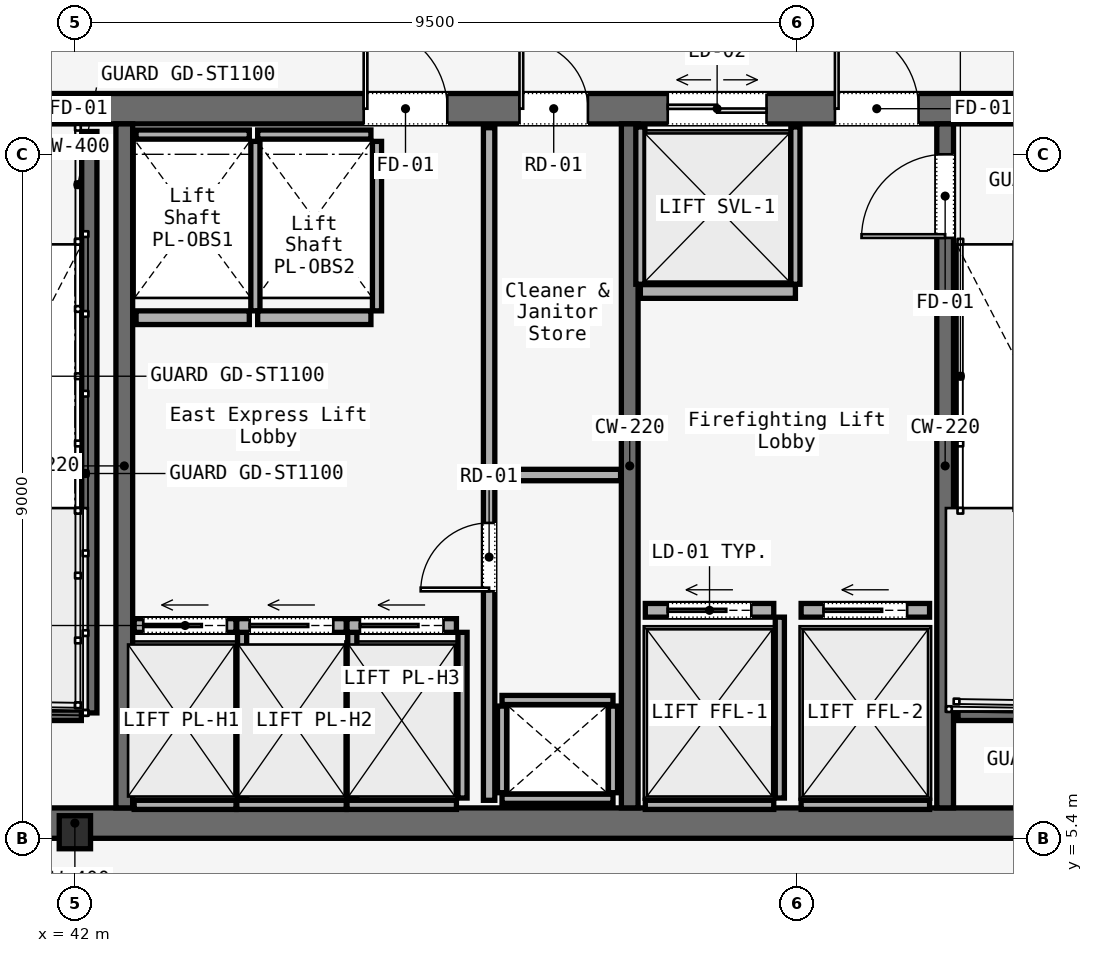
"""IFC4 building model, lengths in metres.
Left out: names, types, materials, properties, quantities, classifications, styles, units other than length and angle.
Written with IfcOpenShell. Run it as: python <this file> out.ifc"""

import sys

from ifc_helpers import new_model, si_unit, direction, frame, frame_2d, origin, origin_2d, place, context, subcontext, project, spatial, rectangle, i_section, extrude, element, fill, save


model = new_model("IFC4")
c1 = context("Model", 3, precision=1e-05, world=origin(), true_north=direction((0.0, 1.0)))
c2 = subcontext(c1, "Body", "Model", "MODEL_VIEW")
j1 = project(units=[si_unit("LENGTHUNIT", "METRE"), si_unit("PLANEANGLEUNIT", "RADIAN")], contexts=[c1])
p1 = place(None, origin())
s1 = spatial("IfcSite", under=j1, at=p1, CompositionType="ELEMENT")
p2 = place(p1, origin())
s2 = spatial("IfcBuilding", under=s1, at=p2, CompositionType="ELEMENT")
p3 = place(p2, frame((0.0, 0.0, 208.4)))
s3 = spatial("IfcBuildingStorey", under=s2, at=p3, CompositionType="ELEMENT", Elevation=208.4)
p4 = place(p3, frame((26.45, 15.0, 0.0), z_axis=(0.0, 0.0, 1.0), x_axis=(1.0, 0.0, 0.0)))
e1 = element("IfcWall", 1, at=p4, inside=s3, PredefinedType="SOLIDWALL", context=c2, shape_type="SweptSolid", body=[
    extrude(rectangle(XDim=31.1, YDim=0.4, at=frame_2d((15.55, 0.0))), origin(), (0.0, 0.0, 1.0), 4.52),
])
p5 = place(p4, frame((1.65, 0.0, 0.0)))
e2 = element("IfcOpeningElement", 2, at=p5, cuts=e1, PredefinedType="OPENING", context=c2, shape_type="SweptSolid", body=[
    extrude(rectangle(XDim=1.1, YDim=2.2, at=frame_2d((0.55, 1.1))), frame((0.0, 0.2, 0.0), z_axis=(0.0, -1.0, 0.0), x_axis=(1.0, 0.0, 0.0)), (0.0, 0.0, 1.0), 0.4),
])
p6 = place(p4, frame((13.65, 0.0, 0.0)))
e3 = element("IfcOpeningElement", 3, at=p6, cuts=e1, PredefinedType="OPENING", context=c2, shape_type="SweptSolid", body=[
    extrude(rectangle(XDim=1.1, YDim=2.2, at=frame_2d((0.55, 1.1))), frame((0.0, 0.2, 0.0), z_axis=(0.0, -1.0, 0.0), x_axis=(1.0, 0.0, 0.0)), (0.0, 0.0, 1.0), 0.4),
])
p7 = place(p4, frame((25.55, 0.0, 0.0)))
e4 = element("IfcOpeningElement", 4, at=p7, cuts=e1, PredefinedType="OPENING", context=c2, shape_type="SweptSolid", body=[
    extrude(rectangle(XDim=1.1, YDim=2.2, at=frame_2d((0.55, 1.1))), frame((0.0, 0.2, 0.0), z_axis=(0.0, -1.0, 0.0), x_axis=(1.0, 0.0, 0.0)), (0.0, 0.0, 1.0), 0.4),
])
p8 = place(p4, frame((10.7, 0.0, 0.0)))
e5 = element("IfcOpeningElement", 5, at=p8, cuts=e1, PredefinedType="OPENING", context=c2, shape_type="SweptSolid", body=[
    extrude(rectangle(XDim=1.4, YDim=2.2, at=frame_2d((0.7, 1.1))), frame((0.0, 0.2, 0.0), z_axis=(0.0, -1.0, 0.0), x_axis=(1.0, 0.0, 0.0)), (0.0, 0.0, 1.0), 0.4),
])
p9 = place(p4, frame((19.35, 0.0, 0.0)))
e6 = element("IfcOpeningElement", 6, at=p9, cuts=e1, PredefinedType="OPENING", context=c2, shape_type="SweptSolid", body=[
    extrude(rectangle(XDim=1.1, YDim=2.2, at=frame_2d((0.55, 1.1))), frame((0.0, 0.2, 0.0), z_axis=(0.0, -1.0, 0.0), x_axis=(1.0, 0.0, 0.0)), (0.0, 0.0, 1.0), 0.4),
])
p10 = place(p4, frame((21.4, 0.0, 0.0)))
e7 = element("IfcOpeningElement", 7, at=p10, cuts=e1, PredefinedType="OPENING", context=c2, shape_type="SweptSolid", body=[
    extrude(rectangle(XDim=0.9, YDim=2.1, at=frame_2d((0.45, 1.05))), frame((0.0, 0.2, 0.0), z_axis=(0.0, -1.0, 0.0), x_axis=(1.0, 0.0, 0.0)), (0.0, 0.0, 1.0), 0.4),
])
p11 = place(p4, frame((23.35, 0.0, 0.0)))
e8 = element("IfcOpeningElement", 8, at=p11, cuts=e1, PredefinedType="OPENING", context=c2, shape_type="SweptSolid", body=[
    extrude(rectangle(XDim=1.3, YDim=2.3, at=frame_2d((0.65, 1.15))), frame((0.0, 0.2, 0.0), z_axis=(0.0, -1.0, 0.0), x_axis=(1.0, 0.0, 0.0)), (0.0, 0.0, 1.0), 0.4),
])
p12 = place(p3, frame((26.45, 5.6, 0.0), z_axis=(0.0, 0.0, 1.0), x_axis=(1.0, 0.0, 0.0)))
e9 = element("IfcWall", 9, at=p12, inside=s3, PredefinedType="SOLIDWALL", context=c2, shape_type="SweptSolid", body=[
    extrude(rectangle(XDim=31.1, YDim=0.4, at=frame_2d((15.55, 0.0))), origin(), (0.0, 0.0, 1.0), 4.52),
])
for number, where, z_axis, x_axis in (
    (10, (42.65, 5.8, 0.0), (0.0, 0.0, 1.0), (0.0, 1.0, 0.0)),
    (11, (49.3, 5.8, 0.0), (0.0, 0.0, 1.0), (0.0, 1.0, 0.0)),
):
    element("IfcWall", number, at=place(p3, frame(where, z_axis=z_axis, x_axis=x_axis)), inside=s3, PredefinedType="SOLIDWALL", context=c2, shape_type="SweptSolid", body=[
        extrude(rectangle(XDim=9.0, YDim=0.22, at=frame_2d((4.5, 0.0))), origin(), (0.0, 0.0, 1.0), 4.52),
    ])
p13 = place(p3, frame((53.45, 5.8, 0.0), z_axis=(0.0, 0.0, 1.0), x_axis=(0.0, 1.0, 0.0)))
e12 = element("IfcWall", 12, at=p13, inside=s3, PredefinedType="SOLIDWALL", context=c2, shape_type="SweptSolid", body=[
    extrude(rectangle(XDim=9.0, YDim=0.22, at=frame_2d((4.5, 0.0))), origin(), (0.0, 0.0, 1.0), 4.52),
])
p14 = place(p13, frame((7.5, 0.0, 0.0)))
e13 = element("IfcOpeningElement", 13, at=p14, cuts=e12, PredefinedType="OPENING", context=c2, shape_type="SweptSolid", body=[
    extrude(rectangle(XDim=1.1, YDim=2.2, at=frame_2d((0.55, 1.1))), frame((0.0, 0.11, 0.0), z_axis=(0.0, -1.0, 0.0), x_axis=(1.0, 0.0, 0.0)), (0.0, 0.0, 1.0), 0.22),
])
p15 = place(p3, frame((42.0, 5.48, 0.0), z_axis=(0.0, 0.0, 1.0), x_axis=(1.0, 0.0, 0.0)))
e14 = element("IfcColumn", 14, at=p15, inside=s3, PredefinedType="COLUMN", context=c2, shape_type="SweptSolid", body=[
    extrude(i_section(OverallWidth=0.412, OverallDepth=0.435, WebThickness=0.036, FlangeThickness=0.044, FilletRadius=0.015, at=origin_2d()), origin(), (0.0, 0.0, 1.0), 4.52),
])
p16 = place(p3, frame((42.19, 14.7, 0.0), z_axis=(0.0, 0.0, 1.0), x_axis=(0.0, -1.0, 0.0)))
e15 = element("IfcWall", 15, at=p16, inside=s3, PredefinedType="SOLIDWALL", context=c2, shape_type="SweptSolid", body=[
    extrude(rectangle(XDim=7.65, YDim=0.2, at=frame_2d((3.825, 0.0))), origin(), (0.0, 0.0, 1.0), 4.8),
])
for number, where, z_axis, x_axis in (
    (16, (38.97, 7.05, 0.0), (0.0, 0.0, 1.0), (1.0, 0.0, 0.0)),
    (17, (53.62, 7.05, 0.0), (0.0, 0.0, 1.0), (1.0, 0.0, 0.0)),
):
    element("IfcWall", number, at=place(p3, frame(where, z_axis=z_axis, x_axis=x_axis)), inside=s3, PredefinedType="SOLIDWALL", context=c2, shape_type="SweptSolid", body=[
        extrude(rectangle(XDim=3.115, YDim=0.2, at=frame_2d((1.558, 0.0))), origin(), (0.0, 0.0, 1.0), 4.8),
    ])
for number, where, z_axis, x_axis in (
    (18, (47.62, 5.92, 0.0), (0.0, 0.0, 1.0), (1.0, 0.0, 0.0)),
    (19, (47.62, 7.22, 0.0), (0.0, 0.0, 1.0), (1.0, 0.0, 0.0)),
):
    element("IfcWall", number, at=place(p3, frame(where, z_axis=z_axis, x_axis=x_axis)), inside=s3, PredefinedType="SOLIDWALL", context=c2, shape_type="SweptSolid", body=[
        extrude(rectangle(XDim=1.46, YDim=0.12, at=frame_2d((0.73, 0.0))), origin(), (0.0, 0.0, 1.0), 3.39),
    ])
for number, where, z_axis, x_axis in (
    (20, (47.62, 6.0, 0.0), (0.0, 0.0, 1.0), (0.0, 1.0, 0.0)),
    (21, (49.08, 6.0, 0.0), (0.0, 0.0, 1.0), (0.0, 1.0, 0.0)),
):
    element("IfcWall", number, at=place(p3, frame(where, z_axis=z_axis, x_axis=x_axis)), inside=s3, PredefinedType="SOLIDWALL", context=c2, shape_type="SweptSolid", body=[
        extrude(rectangle(XDim=1.14, YDim=0.12, at=frame_2d((0.57, 0.0))), origin(), (0.0, 0.0, 1.0), 3.39),
    ])
p17 = place(p3, frame((47.45, 5.9, 0.0), z_axis=(0.0, 0.0, 1.0), x_axis=(0.0, 1.0, 0.0)))
e22 = element("IfcWall", 22, at=p17, inside=s3, PredefinedType="PARTITIONING", context=c2, shape_type="SweptSolid", body=[
    extrude(rectangle(XDim=8.85, YDim=0.15, at=frame_2d((4.425, 0.0))), origin(), (0.0, 0.0, 1.0), 3.39),
])
p18 = place(p17, frame((2.75, 0.0, 0.0)))
e23 = element("IfcOpeningElement", 23, at=p18, cuts=e22, PredefinedType="OPENING", context=c2, shape_type="SweptSolid", body=[
    extrude(rectangle(XDim=0.9, YDim=2.1, at=frame_2d((0.45, 1.05))), frame((0.0, 0.075, 0.0), z_axis=(0.0, -1.0, 0.0), x_axis=(1.0, 0.0, 0.0)), (0.0, 0.0, 1.0), 0.15),
])
p19 = place(p3, frame((47.45, 10.18, 0.0), z_axis=(0.0, 0.0, 1.0), x_axis=(1.0, 0.0, 0.0)))
e24 = element("IfcWall", 24, at=p19, inside=s3, PredefinedType="PARTITIONING", context=c2, shape_type="SweptSolid", body=[
    extrude(rectangle(XDim=1.73, YDim=0.15, at=frame_2d((0.865, 0.0))), origin(), (0.0, 0.0, 1.0), 3.39),
])
p20 = place(p3, frame((42.78, 8.2, 0.0), z_axis=(0.0, 0.0, 1.0), x_axis=(1.0, 0.0, 0.0)))
e25 = element("IfcWall", 25, at=p20, inside=s3, PredefinedType="SOLIDWALL", context=c2, shape_type="SweptSolid", body=[
    extrude(rectangle(XDim=1.34, YDim=0.18, at=frame_2d((0.67, 0.0))), origin(), (0.0, 0.0, 1.0), 3.39),
])
p21 = place(p20, frame((0.12, 0.0, 0.0)))
e26 = element("IfcOpeningElement", 26, at=p21, cuts=e25, PredefinedType="OPENING", context=c2, shape_type="SweptSolid", body=[
    extrude(rectangle(XDim=1.1, YDim=2.2, at=frame_2d((0.55, 1.1))), frame((0.0, 0.09, 0.0), z_axis=(0.0, -1.0, 0.0), x_axis=(1.0, 0.0, 0.0)), (0.0, 0.0, 1.0), 0.18),
])
p22 = place(p3, frame((42.78, 5.84, 0.0), z_axis=(0.0, 0.0, 1.0), x_axis=(1.0, 0.0, 0.0)))
e27 = element("IfcWall", 27, at=p22, inside=s3, PredefinedType="SOLIDWALL", context=c2, shape_type="SweptSolid", body=[
    extrude(rectangle(XDim=1.34, YDim=0.12, at=frame_2d((0.67, 0.0))), origin(), (0.0, 0.0, 1.0), 3.39),
])
p23 = place(p3, frame((44.2, 5.93, 0.0), z_axis=(0.0, 0.0, 1.0), x_axis=(0.0, 1.0, 0.0)))
e28 = element("IfcWall", 28, at=p23, inside=s3, PredefinedType="SOLIDWALL", context=c2, shape_type="SweptSolid", body=[
    extrude(rectangle(XDim=2.18, YDim=0.12, at=frame_2d((1.09, 0.0))), origin(), (0.0, 0.0, 1.0), 3.39),
])
p24 = place(p3, frame((44.13, 8.2, 0.0), z_axis=(0.0, 0.0, 1.0), x_axis=(1.0, 0.0, 0.0)))
e29 = element("IfcWall", 29, at=p24, inside=s3, PredefinedType="SOLIDWALL", context=c2, shape_type="SweptSolid", body=[
    extrude(rectangle(XDim=1.44, YDim=0.18, at=frame_2d((0.72, 0.0))), origin(), (0.0, 0.0, 1.0), 3.39),
])
p25 = place(p24, frame((0.17, 0.0, 0.0)))
e30 = element("IfcOpeningElement", 30, at=p25, cuts=e29, PredefinedType="OPENING", context=c2, shape_type="SweptSolid", body=[
    extrude(rectangle(XDim=1.1, YDim=2.2, at=frame_2d((0.55, 1.1))), frame((0.0, 0.09, 0.0), z_axis=(0.0, -1.0, 0.0), x_axis=(1.0, 0.0, 0.0)), (0.0, 0.0, 1.0), 0.18),
])
p26 = place(p3, frame((44.13, 5.84, 0.0), z_axis=(0.0, 0.0, 1.0), x_axis=(1.0, 0.0, 0.0)))
e31 = element("IfcWall", 31, at=p26, inside=s3, PredefinedType="SOLIDWALL", context=c2, shape_type="SweptSolid", body=[
    extrude(rectangle(XDim=1.44, YDim=0.12, at=frame_2d((0.72, 0.0))), origin(), (0.0, 0.0, 1.0), 3.39),
])
p27 = place(p3, frame((45.65, 5.93, 0.0), z_axis=(0.0, 0.0, 1.0), x_axis=(0.0, 1.0, 0.0)))
e32 = element("IfcWall", 32, at=p27, inside=s3, PredefinedType="SOLIDWALL", context=c2, shape_type="SweptSolid", body=[
    extrude(rectangle(XDim=2.18, YDim=0.12, at=frame_2d((1.09, 0.0))), origin(), (0.0, 0.0, 1.0), 3.39),
])
p28 = place(p3, frame((45.58, 8.2, 0.0), z_axis=(0.0, 0.0, 1.0), x_axis=(1.0, 0.0, 0.0)))
e33 = element("IfcWall", 33, at=p28, inside=s3, PredefinedType="SOLIDWALL", context=c2, shape_type="SweptSolid", body=[
    extrude(rectangle(XDim=1.44, YDim=0.18, at=frame_2d((0.72, 0.0))), origin(), (0.0, 0.0, 1.0), 3.39),
])
p29 = place(p28, frame((0.17, 0.0, 0.0)))
e34 = element("IfcOpeningElement", 34, at=p29, cuts=e33, PredefinedType="OPENING", context=c2, shape_type="SweptSolid", body=[
    extrude(rectangle(XDim=1.1, YDim=2.2, at=frame_2d((0.55, 1.1))), frame((0.0, 0.09, 0.0), z_axis=(0.0, -1.0, 0.0), x_axis=(1.0, 0.0, 0.0)), (0.0, 0.0, 1.0), 0.18),
])
p30 = place(p3, frame((45.58, 5.84, 0.0), z_axis=(0.0, 0.0, 1.0), x_axis=(1.0, 0.0, 0.0)))
e35 = element("IfcWall", 35, at=p30, inside=s3, PredefinedType="SOLIDWALL", context=c2, shape_type="SweptSolid", body=[
    extrude(rectangle(XDim=1.44, YDim=0.12, at=frame_2d((0.72, 0.0))), origin(), (0.0, 0.0, 1.0), 3.39),
])
p31 = place(p3, frame((47.1, 5.93, 0.0), z_axis=(0.0, 0.0, 1.0), x_axis=(0.0, 1.0, 0.0)))
e36 = element("IfcWall", 36, at=p31, inside=s3, PredefinedType="SOLIDWALL", context=c2, shape_type="SweptSolid", body=[
    extrude(rectangle(XDim=2.18, YDim=0.12, at=frame_2d((1.09, 0.0))), origin(), (0.0, 0.0, 1.0), 3.39),
])
p32 = place(p3, frame((42.805, 12.25, 0.0), z_axis=(0.0, 0.0, 1.0), x_axis=(1.0, 0.0, 0.0)))
e37 = element("IfcWall", 37, at=p32, inside=s3, PredefinedType="SOLIDWALL", context=c2, shape_type="SweptSolid", body=[
    extrude(rectangle(XDim=1.49, YDim=0.18, at=frame_2d((0.745, 0.0))), origin(), (0.0, 0.0, 1.0), 3.39),
])
p33 = place(p3, frame((42.805, 14.66, 0.0), z_axis=(0.0, 0.0, 1.0), x_axis=(1.0, 0.0, 0.0)))
e38 = element("IfcWall", 38, at=p33, inside=s3, PredefinedType="SOLIDWALL", context=c2, shape_type="SweptSolid", body=[
    extrude(rectangle(XDim=1.49, YDim=0.12, at=frame_2d((0.745, 0.0))), origin(), (0.0, 0.0, 1.0), 3.39),
])
p34 = place(p3, frame((44.375, 12.34, 0.0), z_axis=(0.0, 0.0, 1.0), x_axis=(0.0, 1.0, 0.0)))
e39 = element("IfcWall", 39, at=p34, inside=s3, PredefinedType="SOLIDWALL", context=c2, shape_type="SweptSolid", body=[
    extrude(rectangle(XDim=2.23, YDim=0.12, at=frame_2d((1.115, 0.0))), origin(), (0.0, 0.0, 1.0), 3.39),
])
p35 = place(p3, frame((44.405, 12.25, 0.0), z_axis=(0.0, 0.0, 1.0), x_axis=(1.0, 0.0, 0.0)))
e40 = element("IfcWall", 40, at=p35, inside=s3, PredefinedType="SOLIDWALL", context=c2, shape_type="SweptSolid", body=[
    extrude(rectangle(XDim=1.49, YDim=0.18, at=frame_2d((0.745, 0.0))), origin(), (0.0, 0.0, 1.0), 3.39),
])
p36 = place(p3, frame((44.405, 14.66, 0.0), z_axis=(0.0, 0.0, 1.0), x_axis=(1.0, 0.0, 0.0)))
e41 = element("IfcWall", 41, at=p36, inside=s3, PredefinedType="SOLIDWALL", context=c2, shape_type="SweptSolid", body=[
    extrude(rectangle(XDim=1.49, YDim=0.12, at=frame_2d((0.745, 0.0))), origin(), (0.0, 0.0, 1.0), 3.39),
])
p37 = place(p3, frame((45.975, 12.34, 0.0), z_axis=(0.0, 0.0, 1.0), x_axis=(0.0, 1.0, 0.0)))
e42 = element("IfcWall", 42, at=p37, inside=s3, PredefinedType="SOLIDWALL", context=c2, shape_type="SweptSolid", body=[
    extrude(rectangle(XDim=2.23, YDim=0.12, at=frame_2d((1.115, 0.0))), origin(), (0.0, 0.0, 1.0), 3.39),
])
p38 = place(p3, frame((49.505, 8.4, 0.0), z_axis=(0.0, 0.0, 1.0), x_axis=(1.0, 0.0, 0.0)))
e43 = element("IfcWall", 43, at=p38, inside=s3, PredefinedType="SOLIDWALL", context=c2, shape_type="SweptSolid", body=[
    extrude(rectangle(XDim=1.69, YDim=0.18, at=frame_2d((0.845, 0.0))), origin(), (0.0, 0.0, 1.0), 3.39),
])
p39 = place(p38, frame((0.295, 0.0, 0.0)))
e44 = element("IfcOpeningElement", 44, at=p39, cuts=e43, PredefinedType="OPENING", context=c2, shape_type="SweptSolid", body=[
    extrude(rectangle(XDim=1.1, YDim=2.2, at=frame_2d((0.55, 1.1))), frame((0.0, 0.09, 0.0), z_axis=(0.0, -1.0, 0.0), x_axis=(1.0, 0.0, 0.0)), (0.0, 0.0, 1.0), 0.18),
])
p40 = place(p3, frame((49.505, 5.84, 0.0), z_axis=(0.0, 0.0, 1.0), x_axis=(1.0, 0.0, 0.0)))
e45 = element("IfcWall", 45, at=p40, inside=s3, PredefinedType="SOLIDWALL", context=c2, shape_type="SweptSolid", body=[
    extrude(rectangle(XDim=1.69, YDim=0.12, at=frame_2d((0.845, 0.0))), origin(), (0.0, 0.0, 1.0), 3.39),
])
p41 = place(p3, frame((51.275, 5.93, 0.0), z_axis=(0.0, 0.0, 1.0), x_axis=(0.0, 1.0, 0.0)))
e46 = element("IfcWall", 46, at=p41, inside=s3, PredefinedType="SOLIDWALL", context=c2, shape_type="SweptSolid", body=[
    extrude(rectangle(XDim=2.38, YDim=0.12, at=frame_2d((1.19, 0.0))), origin(), (0.0, 0.0, 1.0), 3.39),
])
p42 = place(p3, frame((51.555, 8.4, 0.0), z_axis=(0.0, 0.0, 1.0), x_axis=(1.0, 0.0, 0.0)))
e47 = element("IfcWall", 47, at=p42, inside=s3, PredefinedType="SOLIDWALL", context=c2, shape_type="SweptSolid", body=[
    extrude(rectangle(XDim=1.69, YDim=0.18, at=frame_2d((0.845, 0.0))), origin(), (0.0, 0.0, 1.0), 3.39),
])
p43 = place(p42, frame((0.295, 0.0, 0.0)))
e48 = element("IfcOpeningElement", 48, at=p43, cuts=e47, PredefinedType="OPENING", context=c2, shape_type="SweptSolid", body=[
    extrude(rectangle(XDim=1.1, YDim=2.2, at=frame_2d((0.55, 1.1))), frame((0.0, 0.09, 0.0), z_axis=(0.0, -1.0, 0.0), x_axis=(1.0, 0.0, 0.0)), (0.0, 0.0, 1.0), 0.18),
])
p44 = place(p3, frame((51.555, 5.84, 0.0), z_axis=(0.0, 0.0, 1.0), x_axis=(1.0, 0.0, 0.0)))
e49 = element("IfcWall", 49, at=p44, inside=s3, PredefinedType="SOLIDWALL", context=c2, shape_type="SweptSolid", body=[
    extrude(rectangle(XDim=1.69, YDim=0.12, at=frame_2d((0.845, 0.0))), origin(), (0.0, 0.0, 1.0), 3.39),
])
p45 = place(p3, frame((49.44, 12.595, 0.0), z_axis=(0.0, 0.0, 1.0), x_axis=(1.0, 0.0, 0.0)))
e50 = element("IfcWall", 50, at=p45, inside=s3, PredefinedType="SOLIDWALL", context=c2, shape_type="SweptSolid", body=[
    extrude(rectangle(XDim=2.04, YDim=0.18, at=frame_2d((1.02, 0.0))), origin(), (0.0, 0.0, 1.0), 3.39),
])
for number, where, z_axis, x_axis in (
    (51, (49.44, 12.69, 0.0), (0.0, 0.0, 1.0), (0.0, 1.0, 0.0)),
    (52, (51.48, 12.69, 0.0), (0.0, 0.0, 1.0), (0.0, 1.0, 0.0)),
):
    element("IfcWall", number, at=place(p3, frame(where, z_axis=z_axis, x_axis=x_axis)), inside=s3, PredefinedType="SOLIDWALL", context=c2, shape_type="SweptSolid", body=[
        extrude(rectangle(XDim=2.07, YDim=0.12, at=frame_2d((1.035, 0.0))), origin(), (0.0, 0.0, 1.0), 3.39),
    ])
p46 = place(p7, origin())
e53 = element("IfcDoor", 53, at=p46, inside=s3, OperationType="SINGLE_SWING_RIGHT", PredefinedType="DOOR", context=c2, shape_type="SweptSolid", body=[
    extrude(rectangle(XDim=1.1, YDim=2.2, at=frame_2d((0.55, 1.1))), frame((0.0, 0.025, 0.0), z_axis=(0.0, -1.0, 0.0), x_axis=(1.0, 0.0, 0.0)), (0.0, 0.0, 1.0), 0.05),
])
fill(e4, e53)
p47 = place(p9, origin())
e54 = element("IfcDoor", 54, at=p47, inside=s3, OperationType="SINGLE_SWING_LEFT", PredefinedType="DOOR", context=c2, shape_type="SweptSolid", body=[
    extrude(rectangle(XDim=1.1, YDim=2.2, at=frame_2d((0.55, 1.1))), frame((0.0, 0.025, 0.0), z_axis=(0.0, -1.0, 0.0), x_axis=(1.0, 0.0, 0.0)), (0.0, 0.0, 1.0), 0.05),
])
fill(e6, e54)
p48 = place(p10, origin())
e55 = element("IfcDoor", 55, at=p48, inside=s3, OperationType="SINGLE_SWING_LEFT", PredefinedType="DOOR", context=c2, shape_type="SweptSolid", body=[
    extrude(rectangle(XDim=0.9, YDim=2.1, at=frame_2d((0.45, 1.05))), frame((0.0, 0.025, 0.0), z_axis=(0.0, -1.0, 0.0), x_axis=(1.0, 0.0, 0.0)), (0.0, 0.0, 1.0), 0.05),
])
fill(e7, e55)
p49 = place(p14, origin())
e56 = element("IfcDoor", 56, at=p49, inside=s3, OperationType="SINGLE_SWING_LEFT", PredefinedType="DOOR", context=c2, shape_type="SweptSolid", body=[
    extrude(rectangle(XDim=1.1, YDim=2.2, at=frame_2d((0.55, 1.1))), frame((0.0, 0.025, 0.0), z_axis=(0.0, -1.0, 0.0), x_axis=(1.0, 0.0, 0.0)), (0.0, 0.0, 1.0), 0.05),
])
fill(e13, e56)
p50 = place(p18, origin())
e57 = element("IfcDoor", 57, at=p50, inside=s3, OperationType="SINGLE_SWING_RIGHT", PredefinedType="DOOR", context=c2, shape_type="SweptSolid", body=[
    extrude(rectangle(XDim=0.9, YDim=2.1, at=frame_2d((0.45, 1.05))), frame((0.0, 0.025, 0.0), z_axis=(0.0, -1.0, 0.0), x_axis=(1.0, 0.0, 0.0)), (0.0, 0.0, 1.0), 0.05),
])
fill(e23, e57)
p51 = place(p21, origin())
e58 = element("IfcDoor", 58, at=p51, inside=s3, OperationType="SLIDING_TO_LEFT", PredefinedType="DOOR", context=c2, shape_type="SweptSolid", body=[
    extrude(rectangle(XDim=1.1, YDim=2.2, at=frame_2d((0.55, 1.1))), frame((0.0, 0.025, 0.0), z_axis=(0.0, -1.0, 0.0), x_axis=(1.0, 0.0, 0.0)), (0.0, 0.0, 1.0), 0.05),
])
fill(e26, e58)
p52 = place(p25, origin())
e59 = element("IfcDoor", 59, at=p52, inside=s3, OperationType="SLIDING_TO_LEFT", PredefinedType="DOOR", context=c2, shape_type="SweptSolid", body=[
    extrude(rectangle(XDim=1.1, YDim=2.2, at=frame_2d((0.55, 1.1))), frame((0.0, 0.025, 0.0), z_axis=(0.0, -1.0, 0.0), x_axis=(1.0, 0.0, 0.0)), (0.0, 0.0, 1.0), 0.05),
])
fill(e30, e59)
p53 = place(p29, origin())
e60 = element("IfcDoor", 60, at=p53, inside=s3, OperationType="SLIDING_TO_LEFT", PredefinedType="DOOR", context=c2, shape_type="SweptSolid", body=[
    extrude(rectangle(XDim=1.1, YDim=2.2, at=frame_2d((0.55, 1.1))), frame((0.0, 0.025, 0.0), z_axis=(0.0, -1.0, 0.0), x_axis=(1.0, 0.0, 0.0)), (0.0, 0.0, 1.0), 0.05),
])
fill(e34, e60)
p54 = place(p39, origin())
e61 = element("IfcDoor", 61, at=p54, inside=s3, OperationType="SLIDING_TO_LEFT", PredefinedType="DOOR", context=c2, shape_type="SweptSolid", body=[
    extrude(rectangle(XDim=1.1, YDim=2.2, at=frame_2d((0.55, 1.1))), frame((0.0, 0.025, 0.0), z_axis=(0.0, -1.0, 0.0), x_axis=(1.0, 0.0, 0.0)), (0.0, 0.0, 1.0), 0.05),
])
fill(e44, e61)
p55 = place(p43, origin())
e62 = element("IfcDoor", 62, at=p55, inside=s3, OperationType="SLIDING_TO_LEFT", PredefinedType="DOOR", context=c2, shape_type="SweptSolid", body=[
    extrude(rectangle(XDim=1.1, YDim=2.2, at=frame_2d((0.55, 1.1))), frame((0.0, 0.025, 0.0), z_axis=(0.0, -1.0, 0.0), x_axis=(1.0, 0.0, 0.0)), (0.0, 0.0, 1.0), 0.05),
])
fill(e48, e62)
p56 = place(p11, origin())
e63 = element("IfcDoor", 63, at=p56, inside=s3, OperationType="DOUBLE_DOOR_SLIDING", PredefinedType="DOOR", context=c2, shape_type="SweptSolid", body=[
    extrude(rectangle(XDim=1.3, YDim=2.3, at=frame_2d((0.65, 1.15))), frame((0.0, 0.025, 0.0), z_axis=(0.0, -1.0, 0.0), x_axis=(1.0, 0.0, 0.0)), (0.0, 0.0, 1.0), 0.05),
])
fill(e8, e63)
save(model, sys.argv[1])
